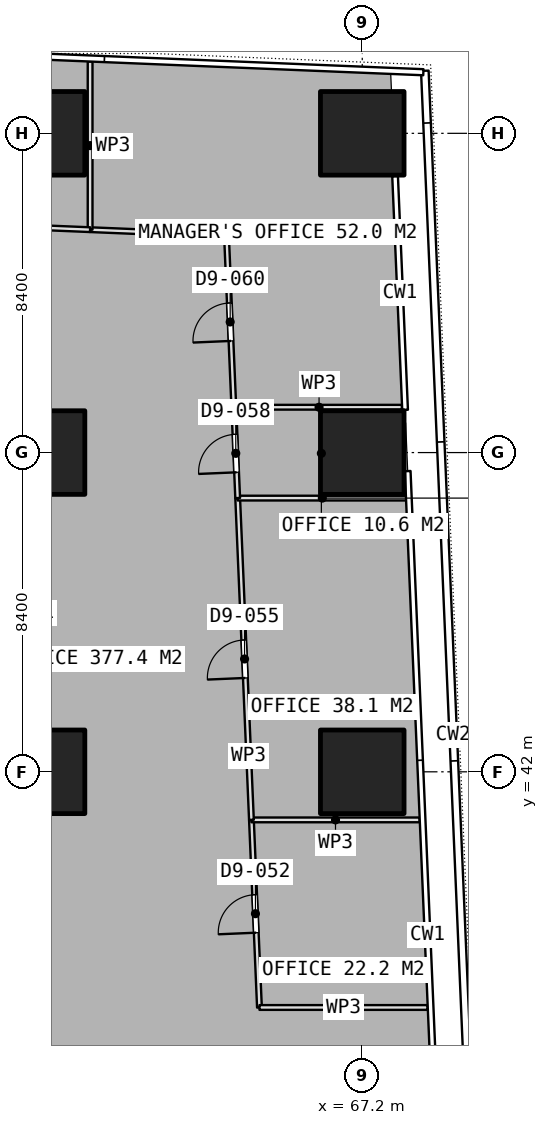
"""IFC4 building model, lengths in metres.
Left out: names, types, materials, properties, quantities, classifications, styles, units other than length and angle.
Written with IfcOpenShell. Run it as: python <this file> out.ifc"""

import sys

from ifc_helpers import new_model, si_unit, direction, frame, frame_2d, origin, origin_2d, place, context, subcontext, project, spatial, rectangle, extrude, element, fill, save


model = new_model("IFC4")
c1 = context("Model", 3, precision=1e-05, world=origin(), true_north=direction((0.0, 1.0)))
c2 = subcontext(c1, "Body", "Model", "MODEL_VIEW")
j1 = project(units=[si_unit("LENGTHUNIT", "METRE"), si_unit("PLANEANGLEUNIT", "RADIAN")], contexts=[c1])
p1 = place(None, origin())
s1 = spatial("IfcSite", under=j1, at=p1, CompositionType="ELEMENT")
p2 = place(p1, origin())
s2 = spatial("IfcBuilding", under=s1, at=p2, CompositionType="ELEMENT")
p3 = place(p2, frame((0.0, 0.0, 32.9)))
s3 = spatial("IfcBuildingStorey", under=s2, at=p3, CompositionType="ELEMENT", Elevation=32.9)
for number, where, z_axis, x_axis in (
    (1, (58.8, 42.0, 0.0), (0.0, 0.0, 1.0), (1.0, 0.0, 0.0)),
    (2, (58.8, 50.4, 0.0), (0.0, 0.0, 1.0), (1.0, 0.0, 0.0)),
    (3, (58.8, 58.8, 0.0), (0.0, 0.0, 1.0), (1.0, 0.0, 0.0)),
    (4, (67.2, 42.0, 0.0), (0.0, 0.0, 1.0), (1.0, 0.0, 0.0)),
    (5, (67.2, 50.4, 0.0), (0.0, 0.0, 1.0), (1.0, 0.0, 0.0)),
    (6, (67.2, 58.8, 0.0), (0.0, 0.0, 1.0), (1.0, 0.0, 0.0)),
):
    element("IfcColumn", number, at=place(p3, frame(where, z_axis=z_axis, x_axis=x_axis)), inside=s3, PredefinedType="COLUMN", context=c2, shape_type="SweptSolid", body=[
        extrude(rectangle(XDim=2.2, YDim=2.2, at=origin_2d()), origin(), (0.0, 0.0, 1.0), 3.75),
    ])
p4 = place(p3, frame((64.495, 35.799, 0.0), z_axis=(0.0, 0.0, 1.0), x_axis=(-0.04274455531, 0.999086033829, 0.0)))
e7 = element("IfcWall", 7, at=p4, inside=s3, PredefinedType="PARTITIONING", context=c2, shape_type="SweptSolid", body=[
    extrude(rectangle(XDim=4.94, YDim=0.125, at=frame_2d((2.47, 0.0))), origin(), (0.0, 0.0, 1.0), 3.5),
])
p5 = place(p4, frame((1.97, 0.0, 0.0)))
e8 = element("IfcOpeningElement", 8, at=p5, cuts=e7, PredefinedType="OPENING", context=c2, shape_type="SweptSolid", body=[
    extrude(rectangle(XDim=1.0, YDim=2.1, at=frame_2d((0.5, 1.05))), frame((0.0, 0.073, 0.0), z_axis=(0.0, -1.0, 0.0), x_axis=(1.0, 0.0, 0.0)), (0.0, 0.0, 1.0), 0.145),
])
p6 = place(p3, frame((64.284, 40.735, 0.0), z_axis=(0.0, 0.0, 1.0), x_axis=(1.0, 0.0, 0.0)))
e9 = element("IfcWall", 9, at=p6, inside=s3, PredefinedType="PARTITIONING", context=c2, shape_type="SweptSolid", body=[
    extrude(rectangle(XDim=4.424, YDim=0.125, at=frame_2d((2.212, 0.0))), origin(), (0.0, 0.0, 1.0), 3.5),
])
p7 = place(p3, frame((68.919, 35.799, 0.0), z_axis=(0.0, 0.0, 1.0), x_axis=(-1.0, 0.0, 0.0)))
e10 = element("IfcWall", 10, at=p7, inside=s3, PredefinedType="PARTITIONING", context=c2, shape_type="SweptSolid", body=[
    extrude(rectangle(XDim=4.424, YDim=0.125, at=frame_2d((2.212, 0.0))), origin(), (0.0, 0.0, 1.0), 3.5),
])
p8 = place(p3, frame((64.284, 40.736, 0.0), z_axis=(0.0, 0.0, 1.0), x_axis=(-0.04269951426, 0.999087959832, 0.0)))
e11 = element("IfcWall", 11, at=p8, inside=s3, PredefinedType="PARTITIONING", context=c2, shape_type="SweptSolid", body=[
    extrude(rectangle(XDim=8.474, YDim=0.125, at=frame_2d((4.237, 0.0))), origin(), (0.0, 0.0, 1.0), 3.5),
])
p9 = place(p8, frame((3.737, 0.0, 0.0)))
e12 = element("IfcOpeningElement", 12, at=p9, cuts=e11, PredefinedType="OPENING", context=c2, shape_type="SweptSolid", body=[
    extrude(rectangle(XDim=1.0, YDim=2.1, at=frame_2d((0.5, 1.05))), frame((0.0, 0.073, 0.0), z_axis=(0.0, -1.0, 0.0), x_axis=(1.0, 0.0, 0.0)), (0.0, 0.0, 1.0), 0.145),
])
p10 = place(p3, frame((63.922, 49.202, 0.0), z_axis=(0.0, 0.0, 1.0), x_axis=(1.0, 0.0, 0.0)))
e13 = element("IfcWall", 13, at=p10, inside=s3, PredefinedType="PARTITIONING", context=c2, shape_type="SweptSolid", body=[
    extrude(rectangle(XDim=4.454, YDim=0.125, at=frame_2d((2.227, 0.0))), origin(), (0.0, 0.0, 1.0), 3.5),
])
p11 = place(p3, frame((63.922, 49.203, 0.0), z_axis=(0.0, 0.0, 1.0), x_axis=(-0.042501507067, 0.999096402704, 0.0)))
e14 = element("IfcWall", 14, at=p11, inside=s3, PredefinedType="PARTITIONING", context=c2, shape_type="SweptSolid", body=[
    extrude(rectangle(XDim=2.355, YDim=0.125, at=frame_2d((1.178, 0.0))), origin(), (0.0, 0.0, 1.0), 3.5),
])
p12 = place(p11, frame((0.678, 0.0, 0.0)))
e15 = element("IfcOpeningElement", 15, at=p12, cuts=e14, PredefinedType="OPENING", context=c2, shape_type="SweptSolid", body=[
    extrude(rectangle(XDim=1.0, YDim=2.1, at=frame_2d((0.5, 1.05))), frame((0.0, 0.073, 0.0), z_axis=(0.0, -1.0, 0.0), x_axis=(1.0, 0.0, 0.0)), (0.0, 0.0, 1.0), 0.145),
])
p13 = place(p3, frame((63.883, 51.593, 0.0), z_axis=(0.0, 0.0, 1.0), x_axis=(1.0, 0.0, 0.0)))
e16 = element("IfcWall", 16, at=p13, inside=s3, PredefinedType="PARTITIONING", context=c2, shape_type="SweptSolid", body=[
    extrude(rectangle(XDim=4.361, YDim=0.125, at=frame_2d((2.18, 0.0))), origin(), (0.0, 0.0, 1.0), 3.5),
])
p14 = place(p3, frame((63.822, 51.557, 0.0), z_axis=(0.0, 0.0, 1.0), x_axis=(-0.042738513094, 0.999086292318, 0.0)))
e17 = element("IfcWall", 17, at=p14, inside=s3, PredefinedType="PARTITIONING", context=c2, shape_type="SweptSolid", body=[
    extrude(rectangle(XDim=4.564, YDim=0.125, at=frame_2d((2.282, 0.0))), origin(), (0.0, 0.0, 1.0), 3.5),
])
p15 = place(p14, frame((1.782, 0.0, 0.0)))
e18 = element("IfcOpeningElement", 18, at=p15, cuts=e17, PredefinedType="OPENING", context=c2, shape_type="SweptSolid", body=[
    extrude(rectangle(XDim=1.0, YDim=2.1, at=frame_2d((0.5, 1.05))), frame((0.0, 0.073, 0.0), z_axis=(0.0, -1.0, 0.0), x_axis=(1.0, 0.0, 0.0)), (0.0, 0.0, 1.0), 0.145),
])
p16 = place(p3, frame((63.627, 56.117, 0.0), z_axis=(0.0, 0.0, 1.0), x_axis=(-0.999150890799, 0.041200696776, 0.0)))
e19 = element("IfcWall", 19, at=p16, inside=s3, PredefinedType="PARTITIONING", context=c2, shape_type="SweptSolid", body=[
    extrude(rectangle(XDim=3.591, YDim=0.125, at=frame_2d((1.795, 0.0))), origin(), (0.0, 0.0, 1.0), 3.5),
])
p17 = place(p3, frame((60.039, 56.265, 0.0), z_axis=(0.0, 0.0, 1.0), x_axis=(0.0, 1.0, 0.0)))
e20 = element("IfcWall", 20, at=p17, inside=s3, PredefinedType="PARTITIONING", context=c2, shape_type="SweptSolid", body=[
    extrude(rectangle(XDim=4.424, YDim=0.125, at=frame_2d((2.212, 0.0))), origin(), (0.0, 0.0, 1.0), 3.5),
])
p18 = place(p3, frame((60.038, 56.265, 0.0), z_axis=(0.0, 0.0, 1.0), x_axis=(-0.999150321127, 0.041214509478, 0.0)))
e21 = element("IfcWall", 21, at=p18, inside=s3, PredefinedType="PARTITIONING", context=c2, shape_type="SweptSolid", body=[
    extrude(rectangle(XDim=8.299, YDim=0.125, at=frame_2d((4.149, 0.0))), origin(), (0.0, 0.0, 1.0), 3.5),
])
p19 = place(p18, frame((3.65, 0.0, 0.0)))
e22 = element("IfcOpeningElement", 22, at=p19, cuts=e21, PredefinedType="OPENING", context=c2, shape_type="SweptSolid", body=[
    extrude(rectangle(XDim=1.0, YDim=2.1, at=frame_2d((0.5, 1.05))), frame((0.0, 0.073, 0.0), z_axis=(0.0, -1.0, 0.0), x_axis=(1.0, 0.0, 0.0)), (0.0, 0.0, 1.0), 0.145),
])
p20 = place(p5, origin())
e23 = element("IfcDoor", 23, at=p20, inside=s3, OperationType="SINGLE_SWING_LEFT", PredefinedType="DOOR", context=c2, shape_type="SweptSolid", body=[
    extrude(rectangle(XDim=1.0, YDim=2.1, at=frame_2d((0.5, 1.05))), frame((0.0, 0.025, 0.0), z_axis=(0.0, -1.0, 0.0), x_axis=(1.0, 0.0, 0.0)), (0.0, 0.0, 1.0), 0.05),
])
fill(e8, e23)
p21 = place(p9, origin())
e24 = element("IfcDoor", 24, at=p21, inside=s3, OperationType="SINGLE_SWING_LEFT", PredefinedType="DOOR", context=c2, shape_type="SweptSolid", body=[
    extrude(rectangle(XDim=1.0, YDim=2.1, at=frame_2d((0.5, 1.05))), frame((0.0, 0.025, 0.0), z_axis=(0.0, -1.0, 0.0), x_axis=(1.0, 0.0, 0.0)), (0.0, 0.0, 1.0), 0.05),
])
fill(e12, e24)
p22 = place(p12, origin())
e25 = element("IfcDoor", 25, at=p22, inside=s3, OperationType="SINGLE_SWING_LEFT", PredefinedType="DOOR", context=c2, shape_type="SweptSolid", body=[
    extrude(rectangle(XDim=1.0, YDim=2.1, at=frame_2d((0.5, 1.05))), frame((0.0, 0.025, 0.0), z_axis=(0.0, -1.0, 0.0), x_axis=(1.0, 0.0, 0.0)), (0.0, 0.0, 1.0), 0.05),
])
fill(e15, e25)
p23 = place(p15, origin())
e26 = element("IfcDoor", 26, at=p23, inside=s3, OperationType="SINGLE_SWING_LEFT", PredefinedType="DOOR", context=c2, shape_type="SweptSolid", body=[
    extrude(rectangle(XDim=1.0, YDim=2.1, at=frame_2d((0.5, 1.05))), frame((0.0, 0.025, 0.0), z_axis=(0.0, -1.0, 0.0), x_axis=(1.0, 0.0, 0.0)), (0.0, 0.0, 1.0), 0.05),
])
fill(e18, e26)
save(model, sys.argv[1])
